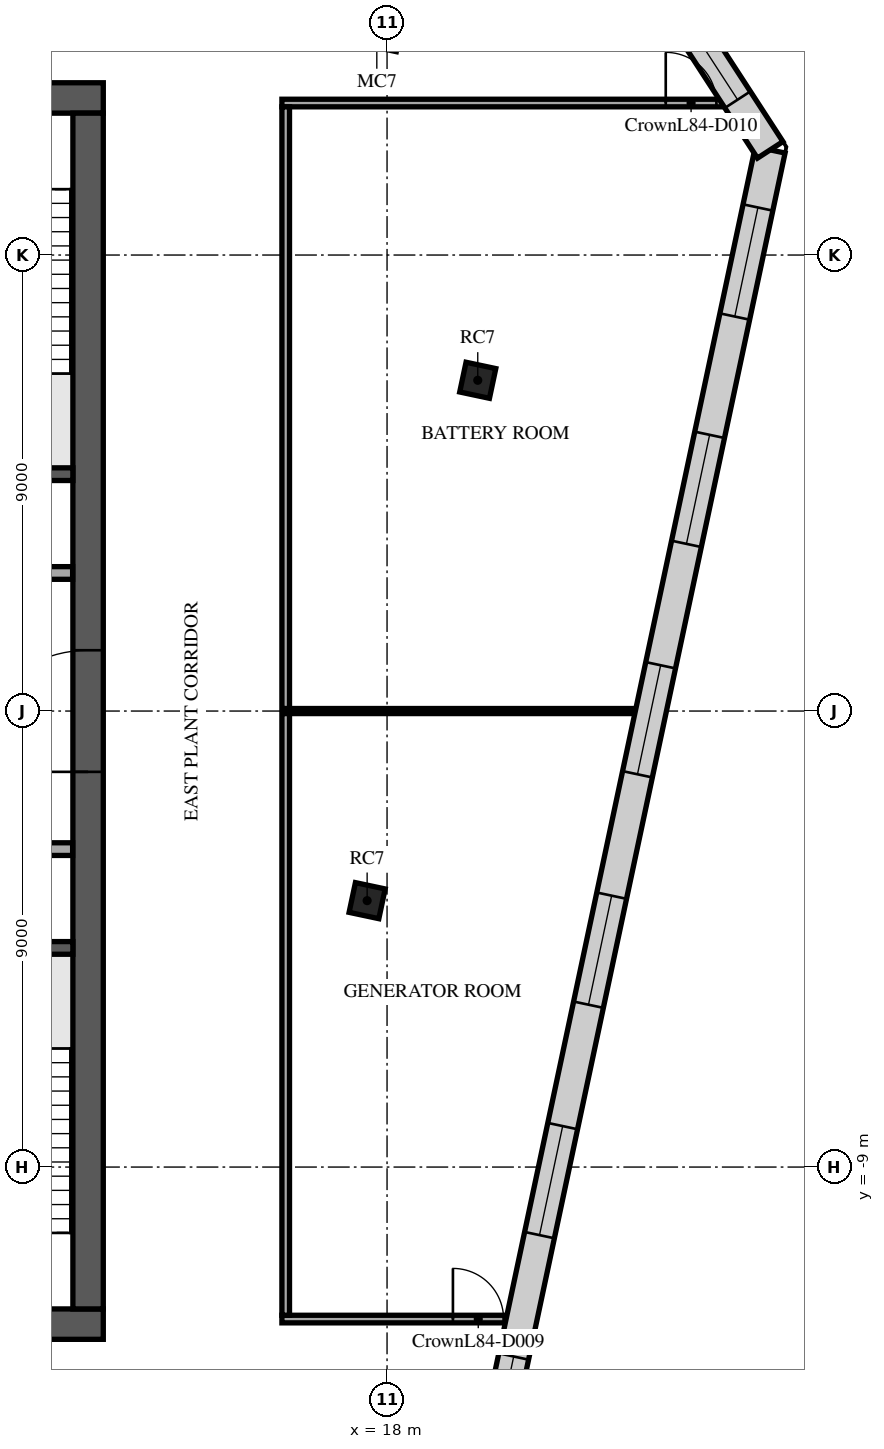
"""IFC4 building model, lengths in metres.
Left out: names, types, materials, properties, quantities, classifications, styles, units other than length and angle.
Written with IfcOpenShell. Run it as: python <this file> out.ifc"""

import sys

from ifc_helpers import new_model, si_unit, direction, frame, frame_2d, origin, origin_2d, place, context, subcontext, project, spatial, rectangle, extrude, element, fill, save


model = new_model("IFC4")
c1 = context("Model", 3, precision=1e-05, world=origin(), true_north=direction((0.0, 1.0)))
c2 = subcontext(c1, "Body", "Model", "MODEL_VIEW")
j1 = project(units=[si_unit("LENGTHUNIT", "METRE"), si_unit("PLANEANGLEUNIT", "RADIAN")], contexts=[c1])
p1 = place(None, origin())
s1 = spatial("IfcSite", under=j1, at=p1, CompositionType="ELEMENT")
p2 = place(p1, origin())
s2 = spatial("IfcBuilding", under=s1, at=p2, CompositionType="ELEMENT")
p3 = place(p2, frame((0.0, 0.0, 358.1)))
s3 = spatial("IfcBuildingStorey", under=s2, at=p3, CompositionType="ELEMENT", Elevation=358.1)
for number, where, z_axis, x_axis in (
    (1, (17.607, -3.742, 0.0), (0.0, 0.0, 1.0), (0.208, 0.978, 0.0)),
    (2, (19.79, 6.528, 0.0), (0.0, 0.0, 1.0), (0.208, 0.978, 0.0)),
):
    element("IfcColumn", number, at=place(p3, frame(where, z_axis=z_axis, x_axis=x_axis)), inside=s3, PredefinedType="COLUMN", context=c2, shape_type="SweptSolid", body=[
        extrude(rectangle(XDim=0.6, YDim=0.6, at=origin_2d()), origin(), (0.0, 0.0, 1.0), 5.0),
    ])
p4 = place(p3, frame((-12.4, 12.1, 0.0), z_axis=(0.0, 0.0, 1.0), x_axis=(1.0, 0.0, 0.0)))
e3 = element("IfcWall", 3, at=p4, inside=s3, PredefinedType="SHEAR", context=c2, shape_type="SweptSolid", body=[
    extrude(rectangle(XDim=24.8, YDim=0.6, at=frame_2d((12.4, 0.0))), origin(), (0.0, 0.0, 1.0), 4.7),
])
p5 = place(p4, frame((11.2, 0.0, 0.0)))
e4 = element("IfcOpeningElement", 4, at=p5, cuts=e3, PredefinedType="OPENING", context=c2, shape_type="SweptSolid", body=[
    extrude(rectangle(XDim=2.4, YDim=2.4, at=frame_2d((1.2, 1.2))), frame((0.0, 0.31, 0.0), z_axis=(0.0, -1.0, 0.0), x_axis=(1.0, 0.0, 0.0)), (0.0, 0.0, 1.0), 0.62),
])
p6 = place(p4, frame((22.025, 0.0, 0.0)))
e5 = element("IfcOpeningElement", 5, at=p6, cuts=e3, PredefinedType="OPENING", context=c2, shape_type="SweptSolid", body=[
    extrude(rectangle(XDim=1.2, YDim=2.1, at=frame_2d((0.6, 1.05))), frame((0.0, 0.31, 0.0), z_axis=(0.0, -1.0, 0.0), x_axis=(1.0, 0.0, 0.0)), (0.0, 0.0, 1.0), 0.62),
])
p7 = place(p4, frame((1.0, 0.0, 0.0)))
e6 = element("IfcOpeningElement", 6, at=p7, cuts=e3, PredefinedType="OPENING", context=c2, shape_type="SweptSolid", body=[
    extrude(rectangle(XDim=1.0, YDim=2.1, at=frame_2d((0.5, 1.05))), frame((0.0, 0.31, 0.0), z_axis=(0.0, -1.0, 0.0), x_axis=(1.0, 0.0, 0.0)), (0.0, 0.0, 1.0), 0.62),
])
p8 = place(p3, frame((-12.4, -12.1, 0.0), z_axis=(0.0, 0.0, 1.0), x_axis=(1.0, 0.0, 0.0)))
e7 = element("IfcWall", 7, at=p8, inside=s3, PredefinedType="SHEAR", context=c2, shape_type="SweptSolid", body=[
    extrude(rectangle(XDim=24.8, YDim=0.6, at=frame_2d((12.4, 0.0))), origin(), (0.0, 0.0, 1.0), 4.7),
])
p9 = place(p8, frame((7.3, 0.0, 0.0)))
e8 = element("IfcOpeningElement", 8, at=p9, cuts=e7, PredefinedType="OPENING", context=c2, shape_type="SweptSolid", body=[
    extrude(rectangle(XDim=2.0, YDim=2.1, at=frame_2d((1.0, 1.05))), frame((0.0, 0.31, 0.0), z_axis=(0.0, -1.0, 0.0), x_axis=(1.0, 0.0, 0.0)), (0.0, 0.0, 1.0), 0.62),
])
p10 = place(p8, frame((17.425, 0.0, 0.0)))
e9 = element("IfcOpeningElement", 9, at=p10, cuts=e7, PredefinedType="OPENING", context=c2, shape_type="SweptSolid", body=[
    extrude(rectangle(XDim=1.2, YDim=2.1, at=frame_2d((0.6, 1.05))), frame((0.0, 0.31, 0.0), z_axis=(0.0, -1.0, 0.0), x_axis=(1.0, 0.0, 0.0)), (0.0, 0.0, 1.0), 0.62),
])
p11 = place(p8, frame((1.575, 0.0, 0.0)))
e10 = element("IfcOpeningElement", 10, at=p11, cuts=e7, PredefinedType="OPENING", context=c2, shape_type="SweptSolid", body=[
    extrude(rectangle(XDim=1.2, YDim=2.1, at=frame_2d((0.6, 1.05))), frame((0.0, 0.31, 0.0), z_axis=(0.0, -1.0, 0.0), x_axis=(1.0, 0.0, 0.0)), (0.0, 0.0, 1.0), 0.62),
])
p12 = place(p8, frame((22.025, 0.0, 0.0)))
e11 = element("IfcOpeningElement", 11, at=p12, cuts=e7, PredefinedType="OPENING", context=c2, shape_type="SweptSolid", body=[
    extrude(rectangle(XDim=1.2, YDim=2.1, at=frame_2d((0.6, 1.05))), frame((0.0, 0.31, 0.0), z_axis=(0.0, -1.0, 0.0), x_axis=(1.0, 0.0, 0.0)), (0.0, 0.0, 1.0), 0.62),
])
p13 = place(p3, frame((12.1, -11.8, 0.0), z_axis=(0.0, 0.0, 1.0), x_axis=(0.0, 1.0, 0.0)))
e12 = element("IfcWall", 12, at=p13, inside=s3, PredefinedType="SHEAR", context=c2, shape_type="SweptSolid", body=[
    extrude(rectangle(XDim=23.6, YDim=0.6, at=frame_2d((11.8, 0.0))), origin(), (0.0, 0.0, 1.0), 4.7),
])
p14 = place(p13, frame((10.6, 0.0, 0.0)))
e13 = element("IfcOpeningElement", 13, at=p14, cuts=e12, PredefinedType="OPENING", context=c2, shape_type="SweptSolid", body=[
    extrude(rectangle(XDim=2.4, YDim=2.4, at=frame_2d((1.2, 1.2))), frame((0.0, 0.31, 0.0), z_axis=(0.0, -1.0, 0.0), x_axis=(1.0, 0.0, 0.0)), (0.0, 0.0, 1.0), 0.62),
])
for number, where, z_axis, x_axis in (
    (14, (8.65, 4.675, 0.0), (0.0, 0.0, 1.0), (1.0, 0.0, 0.0)),
    (15, (8.65, -4.675, 0.0), (0.0, 0.0, 1.0), (1.0, 0.0, 0.0)),
):
    element("IfcWall", number, at=place(p3, frame(where, z_axis=z_axis, x_axis=x_axis)), inside=s3, PredefinedType="SOLIDWALL", context=c2, shape_type="SweptSolid", body=[
        extrude(rectangle(XDim=3.15, YDim=0.25, at=frame_2d((1.575, 0.0))), origin(), (0.0, 0.0, 1.0), 4.7),
    ])
p15 = place(p3, frame((5.63, -2.725, 0.0), z_axis=(0.0, 0.0, 1.0), x_axis=(1.0, 0.0, 0.0)))
e16 = element("IfcWall", 16, at=p15, inside=s3, PredefinedType="PARTITIONING", context=c2, shape_type="SweptSolid", body=[
    extrude(rectangle(XDim=6.165, YDim=0.25, at=frame_2d((3.083, 0.0))), origin(), (0.0, 0.0, 1.0), 4.7),
])
p16 = place(p15, frame((0.745, 0.0, 0.0)))
e17 = element("IfcOpeningElement", 17, at=p16, cuts=e16, PredefinedType="OPENING", context=c2, shape_type="SweptSolid", body=[
    extrude(rectangle(XDim=1.0, YDim=2.1, at=frame_2d((0.5, 1.05))), frame((0.0, 0.135, 0.0), z_axis=(0.0, -1.0, 0.0), x_axis=(1.0, 0.0, 0.0)), (0.0, 0.0, 1.0), 0.27),
])
p17 = place(p15, frame((3.92, 0.0, 0.0)))
e18 = element("IfcOpeningElement", 18, at=p17, cuts=e16, PredefinedType="OPENING", context=c2, shape_type="SweptSolid", body=[
    extrude(rectangle(XDim=0.9, YDim=2.1, at=frame_2d((0.45, 1.05))), frame((0.0, 0.135, 0.0), z_axis=(0.0, -1.0, 0.0), x_axis=(1.0, 0.0, 0.0)), (0.0, 0.0, 1.0), 0.27),
])
p18 = place(p3, frame((-11.795, 2.725, 0.0), z_axis=(0.0, 0.0, 1.0), x_axis=(1.0, 0.0, 0.0)))
e19 = element("IfcWall", 19, at=p18, inside=s3, PredefinedType="PARTITIONING", context=c2, shape_type="SweptSolid", body=[
    extrude(rectangle(XDim=23.59, YDim=0.25, at=frame_2d((11.795, 0.0))), origin(), (0.0, 0.0, 1.0), 4.7),
])
p19 = place(p18, frame((21.345, 0.0, 0.0)))
e20 = element("IfcOpeningElement", 20, at=p19, cuts=e19, PredefinedType="OPENING", context=c2, shape_type="SweptSolid", body=[
    extrude(rectangle(XDim=0.9, YDim=2.1, at=frame_2d((0.45, 1.05))), frame((0.0, 0.135, 0.0), z_axis=(0.0, -1.0, 0.0), x_axis=(1.0, 0.0, 0.0)), (0.0, 0.0, 1.0), 0.27),
])
p20 = place(p18, frame((1.345, 0.0, 0.0)))
e21 = element("IfcOpeningElement", 21, at=p20, cuts=e19, PredefinedType="OPENING", context=c2, shape_type="SweptSolid", body=[
    extrude(rectangle(XDim=0.9, YDim=2.1, at=frame_2d((0.45, 1.05))), frame((0.0, 0.135, 0.0), z_axis=(0.0, -1.0, 0.0), x_axis=(1.0, 0.0, 0.0)), (0.0, 0.0, 1.0), 0.27),
])
p21 = place(p18, frame((4.32, 0.0, 0.0)))
e22 = element("IfcOpeningElement", 22, at=p21, cuts=e19, PredefinedType="OPENING", context=c2, shape_type="SweptSolid", body=[
    extrude(rectangle(XDim=1.2, YDim=2.1, at=frame_2d((0.6, 1.05))), frame((0.0, 0.135, 0.0), z_axis=(0.0, -1.0, 0.0), x_axis=(1.0, 0.0, 0.0)), (0.0, 0.0, 1.0), 0.27),
])
p22 = place(p18, frame((12.57, 0.0, 0.0)))
e23 = element("IfcOpeningElement", 23, at=p22, cuts=e19, PredefinedType="OPENING", context=c2, shape_type="SweptSolid", body=[
    extrude(rectangle(XDim=1.2, YDim=2.1, at=frame_2d((0.6, 1.05))), frame((0.0, 0.135, 0.0), z_axis=(0.0, -1.0, 0.0), x_axis=(1.0, 0.0, 0.0)), (0.0, 0.0, 1.0), 0.27),
])
p23 = place(p3, frame((15.925, -12.0, 0.0), z_axis=(0.0, 0.0, 1.0), x_axis=(1.0, 0.0, 0.0)))
e24 = element("IfcWall", 24, at=p23, inside=s3, PredefinedType="PARTITIONING", context=c2, shape_type="SweptSolid", body=[
    extrude(rectangle(XDim=4.629, YDim=0.15, at=frame_2d((2.314, 0.0))), origin(), (0.0, 0.0, 1.0), 4.7),
])
p24 = place(p23, frame((3.375, 0.0, 0.0)))
e25 = element("IfcOpeningElement", 25, at=p24, cuts=e24, PredefinedType="OPENING", context=c2, shape_type="SweptSolid", body=[
    extrude(rectangle(XDim=1.0, YDim=2.1, at=frame_2d((0.5, 1.05))), frame((0.0, 0.085, 0.0), z_axis=(0.0, -1.0, 0.0), x_axis=(1.0, 0.0, 0.0)), (0.0, 0.0, 1.0), 0.17),
])
p25 = place(p3, frame((16.075, 0.0, 0.0), z_axis=(0.0, 0.0, 1.0), x_axis=(1.0, 0.0, 0.0)))
e26 = element("IfcWall", 26, at=p25, inside=s3, PredefinedType="PARTITIONING", context=c2, shape_type="SweptSolid", body=[
    extrude(rectangle(XDim=7.03, YDim=0.1, at=frame_2d((3.515, 0.0))), origin(), (0.0, 0.0, 1.0), 4.7),
])
p26 = place(p3, frame((15.925, 12.0, 0.0), z_axis=(0.0, 0.0, 1.0), x_axis=(1.0, 0.0, 0.0)))
e27 = element("IfcWall", 27, at=p26, inside=s3, PredefinedType="PARTITIONING", context=c2, shape_type="SweptSolid", body=[
    extrude(rectangle(XDim=8.917, YDim=0.15, at=frame_2d((4.458, 0.0))), origin(), (0.0, 0.0, 1.0), 4.7),
])
p27 = place(p26, frame((7.575, 0.0, 0.0)))
e28 = element("IfcOpeningElement", 28, at=p27, cuts=e27, PredefinedType="OPENING", context=c2, shape_type="SweptSolid", body=[
    extrude(rectangle(XDim=1.0, YDim=2.1, at=frame_2d((0.5, 1.05))), frame((0.0, 0.085, 0.0), z_axis=(0.0, -1.0, 0.0), x_axis=(1.0, 0.0, 0.0)), (0.0, 0.0, 1.0), 0.17),
])
p28 = place(p3, frame((16.0, -11.925, 0.0), z_axis=(0.0, 0.0, 1.0), x_axis=(0.0, 1.0, 0.0)))
e29 = element("IfcWall", 29, at=p28, inside=s3, PredefinedType="PARTITIONING", context=c2, shape_type="SweptSolid", body=[
    extrude(rectangle(XDim=11.875, YDim=0.15, at=frame_2d((5.938, 0.0))), origin(), (0.0, 0.0, 1.0), 4.32),
])
p29 = place(p3, frame((16.0, 0.05, 0.0), z_axis=(0.0, 0.0, 1.0), x_axis=(0.0, 1.0, 0.0)))
e30 = element("IfcWall", 30, at=p29, inside=s3, PredefinedType="PARTITIONING", context=c2, shape_type="SweptSolid", body=[
    extrude(rectangle(XDim=11.875, YDim=0.15, at=frame_2d((5.938, 0.0))), origin(), (0.0, 0.0, 1.0), 4.7),
])
p30 = place(p3, frame((18.847, -20.514, 0.0), z_axis=(0.0, 0.0, 1.0), x_axis=(0.207910832809, 0.978147783109, 0.0)))
e31 = element("IfcWall", 31, at=p30, inside=s3, PredefinedType="STANDARD", context=c2, shape_type="SweptSolid", body=[
    extrude(rectangle(XDim=32.296, YDim=0.6, at=frame_2d((16.148, 0.0))), origin(), (0.0, 0.0, 1.0), 4.7),
])
p31 = place(p30, frame((1.163, 0.0, 0.6)))
e32 = element("IfcOpeningElement", 32, at=p31, cuts=e31, PredefinedType="OPENING", context=c2, shape_type="SweptSolid", body=[
    extrude(rectangle(XDim=2.2, YDim=3.35, at=frame_2d((1.1, 1.675))), frame((0.0, 0.31, 0.0), z_axis=(0.0, -1.0, 0.0), x_axis=(1.0, 0.0, 0.0)), (0.0, 0.0, 1.0), 0.62),
])
p32 = place(p30, frame((5.75, 0.0, 0.6)))
e33 = element("IfcOpeningElement", 33, at=p32, cuts=e31, PredefinedType="OPENING", context=c2, shape_type="SweptSolid", body=[
    extrude(rectangle(XDim=2.2, YDim=3.35, at=frame_2d((1.1, 1.675))), frame((0.0, 0.31, 0.0), z_axis=(0.0, -1.0, 0.0), x_axis=(1.0, 0.0, 0.0)), (0.0, 0.0, 1.0), 0.62),
])
p33 = place(p30, frame((10.399, 0.0, 0.6)))
e34 = element("IfcOpeningElement", 34, at=p33, cuts=e31, PredefinedType="OPENING", context=c2, shape_type="SweptSolid", body=[
    extrude(rectangle(XDim=2.2, YDim=3.35, at=frame_2d((1.1, 1.675))), frame((0.0, 0.31, 0.0), z_axis=(0.0, -1.0, 0.0), x_axis=(1.0, 0.0, 0.0)), (0.0, 0.0, 1.0), 0.62),
])
p34 = place(p30, frame((15.048, 0.0, 0.6)))
e35 = element("IfcOpeningElement", 35, at=p34, cuts=e31, PredefinedType="OPENING", context=c2, shape_type="SweptSolid", body=[
    extrude(rectangle(XDim=2.2, YDim=3.35, at=frame_2d((1.1, 1.675))), frame((0.0, 0.31, 0.0), z_axis=(0.0, -1.0, 0.0), x_axis=(1.0, 0.0, 0.0)), (0.0, 0.0, 1.0), 0.62),
])
p35 = place(p30, frame((19.697, 0.0, 0.6)))
e36 = element("IfcOpeningElement", 36, at=p35, cuts=e31, PredefinedType="OPENING", context=c2, shape_type="SweptSolid", body=[
    extrude(rectangle(XDim=2.2, YDim=3.35, at=frame_2d((1.1, 1.675))), frame((0.0, 0.31, 0.0), z_axis=(0.0, -1.0, 0.0), x_axis=(1.0, 0.0, 0.0)), (0.0, 0.0, 1.0), 0.62),
])
p36 = place(p30, frame((24.346, 0.0, 0.6)))
e37 = element("IfcOpeningElement", 37, at=p36, cuts=e31, PredefinedType="OPENING", context=c2, shape_type="SweptSolid", body=[
    extrude(rectangle(XDim=2.2, YDim=3.35, at=frame_2d((1.1, 1.675))), frame((0.0, 0.31, 0.0), z_axis=(0.0, -1.0, 0.0), x_axis=(1.0, 0.0, 0.0)), (0.0, 0.0, 1.0), 0.62),
])
p37 = place(p30, frame((28.933, 0.0, 0.6)))
e38 = element("IfcOpeningElement", 38, at=p37, cuts=e31, PredefinedType="OPENING", context=c2, shape_type="SweptSolid", body=[
    extrude(rectangle(XDim=2.2, YDim=3.35, at=frame_2d((1.1, 1.675))), frame((0.0, 0.31, 0.0), z_axis=(0.0, -1.0, 0.0), x_axis=(1.0, 0.0, 0.0)), (0.0, 0.0, 1.0), 0.62),
])
p38 = place(p3, frame((25.561, 11.075, 0.0), z_axis=(0.0, 0.0, 1.0), x_axis=(-0.544642093959, 0.838668581436, 0.0)))
e39 = element("IfcWall", 39, at=p38, inside=s3, PredefinedType="STANDARD", context=c2, shape_type="SweptSolid", body=[
    extrude(rectangle(XDim=13.509, YDim=0.6, at=frame_2d((6.754, 0.0))), origin(), (0.0, 0.0, 1.0), 4.7),
])
p39 = place(p38, frame((1.181, 0.0, 0.6)))
e40 = element("IfcOpeningElement", 40, at=p39, cuts=e39, PredefinedType="OPENING", context=c2, shape_type="SweptSolid", body=[
    extrude(rectangle(XDim=2.1, YDim=3.35, at=frame_2d((1.05, 1.675))), frame((0.0, 0.31, 0.0), z_axis=(0.0, -1.0, 0.0), x_axis=(1.0, 0.0, 0.0)), (0.0, 0.0, 1.0), 0.62),
])
p40 = place(p38, frame((5.704, 0.0, 0.6)))
e41 = element("IfcOpeningElement", 41, at=p40, cuts=e39, PredefinedType="OPENING", context=c2, shape_type="SweptSolid", body=[
    extrude(rectangle(XDim=2.1, YDim=3.35, at=frame_2d((1.05, 1.675))), frame((0.0, 0.31, 0.0), z_axis=(0.0, -1.0, 0.0), x_axis=(1.0, 0.0, 0.0)), (0.0, 0.0, 1.0), 0.62),
])
p41 = place(p38, frame((10.228, 0.0, 0.6)))
e42 = element("IfcOpeningElement", 42, at=p41, cuts=e39, PredefinedType="OPENING", context=c2, shape_type="SweptSolid", body=[
    extrude(rectangle(XDim=2.1, YDim=3.35, at=frame_2d((1.05, 1.675))), frame((0.0, 0.31, 0.0), z_axis=(0.0, -1.0, 0.0), x_axis=(1.0, 0.0, 0.0)), (0.0, 0.0, 1.0), 0.62),
])
p42 = place(p14, origin())
e43 = element("IfcDoor", 43, at=p42, inside=s3, OperationType="SINGLE_SWING_LEFT", PredefinedType="DOOR", context=c2, shape_type="SweptSolid", body=[
    extrude(rectangle(XDim=2.4, YDim=2.4, at=frame_2d((1.2, 1.2))), frame((0.0, 0.025, 0.0), z_axis=(0.0, -1.0, 0.0), x_axis=(1.0, 0.0, 0.0)), (0.0, 0.0, 1.0), 0.05),
])
fill(e13, e43)
p43 = place(p24, origin())
e44 = element("IfcDoor", 44, at=p43, inside=s3, OperationType="SINGLE_SWING_LEFT", PredefinedType="DOOR", context=c2, shape_type="SweptSolid", body=[
    extrude(rectangle(XDim=1.0, YDim=2.1, at=frame_2d((0.5, 1.05))), frame((0.0, 0.025, 0.0), z_axis=(0.0, -1.0, 0.0), x_axis=(1.0, 0.0, 0.0)), (0.0, 0.0, 1.0), 0.05),
])
fill(e25, e44)
p44 = place(p27, origin())
e45 = element("IfcDoor", 45, at=p44, inside=s3, OperationType="SINGLE_SWING_RIGHT", PredefinedType="DOOR", context=c2, shape_type="SweptSolid", body=[
    extrude(rectangle(XDim=1.0, YDim=2.1, at=frame_2d((0.5, 1.05))), frame((0.0, 0.025, 0.0), z_axis=(0.0, -1.0, 0.0), x_axis=(1.0, 0.0, 0.0)), (0.0, 0.0, 1.0), 0.05),
])
fill(e28, e45)
p45 = place(p32, origin())
e46 = element("IfcWindow", 46, at=p45, inside=s3, PartitioningType="SINGLE_PANEL", PredefinedType="USERDEFINED", context=c2, shape_type="SweptSolid", body=[
    extrude(rectangle(XDim=2.2, YDim=3.35, at=frame_2d((1.1, 1.675))), frame((0.0, 0.03, 0.0), z_axis=(0.0, -1.0, 0.0), x_axis=(1.0, 0.0, 0.0)), (0.0, 0.0, 1.0), 0.06),
])
fill(e33, e46)
p46 = place(p33, origin())
e47 = element("IfcWindow", 47, at=p46, inside=s3, PartitioningType="SINGLE_PANEL", PredefinedType="USERDEFINED", context=c2, shape_type="SweptSolid", body=[
    extrude(rectangle(XDim=2.2, YDim=3.35, at=frame_2d((1.1, 1.675))), frame((0.0, 0.03, 0.0), z_axis=(0.0, -1.0, 0.0), x_axis=(1.0, 0.0, 0.0)), (0.0, 0.0, 1.0), 0.06),
])
fill(e34, e47)
p47 = place(p34, origin())
e48 = element("IfcWindow", 48, at=p47, inside=s3, PartitioningType="SINGLE_PANEL", PredefinedType="USERDEFINED", context=c2, shape_type="SweptSolid", body=[
    extrude(rectangle(XDim=2.2, YDim=3.35, at=frame_2d((1.1, 1.675))), frame((0.0, 0.03, 0.0), z_axis=(0.0, -1.0, 0.0), x_axis=(1.0, 0.0, 0.0)), (0.0, 0.0, 1.0), 0.06),
])
fill(e35, e48)
p48 = place(p35, origin())
e49 = element("IfcWindow", 49, at=p48, inside=s3, PartitioningType="SINGLE_PANEL", PredefinedType="USERDEFINED", context=c2, shape_type="SweptSolid", body=[
    extrude(rectangle(XDim=2.2, YDim=3.35, at=frame_2d((1.1, 1.675))), frame((0.0, 0.03, 0.0), z_axis=(0.0, -1.0, 0.0), x_axis=(1.0, 0.0, 0.0)), (0.0, 0.0, 1.0), 0.06),
])
fill(e36, e49)
p49 = place(p36, origin())
e50 = element("IfcWindow", 50, at=p49, inside=s3, PartitioningType="SINGLE_PANEL", PredefinedType="USERDEFINED", context=c2, shape_type="SweptSolid", body=[
    extrude(rectangle(XDim=2.2, YDim=3.35, at=frame_2d((1.1, 1.675))), frame((0.0, 0.03, 0.0), z_axis=(0.0, -1.0, 0.0), x_axis=(1.0, 0.0, 0.0)), (0.0, 0.0, 1.0), 0.06),
])
fill(e37, e50)
p50 = place(p37, origin())
e51 = element("IfcWindow", 51, at=p50, inside=s3, PartitioningType="SINGLE_PANEL", PredefinedType="USERDEFINED", context=c2, shape_type="SweptSolid", body=[
    extrude(rectangle(XDim=2.2, YDim=3.35, at=frame_2d((1.1, 1.675))), frame((0.0, 0.03, 0.0), z_axis=(0.0, -1.0, 0.0), x_axis=(1.0, 0.0, 0.0)), (0.0, 0.0, 1.0), 0.06),
])
fill(e38, e51)
p51 = place(p39, origin())
e52 = element("IfcWindow", 52, at=p51, inside=s3, PartitioningType="SINGLE_PANEL", PredefinedType="USERDEFINED", context=c2, shape_type="SweptSolid", body=[
    extrude(rectangle(XDim=2.1, YDim=3.35, at=frame_2d((1.05, 1.675))), frame((0.0, 0.03, 0.0), z_axis=(0.0, -1.0, 0.0), x_axis=(1.0, 0.0, 0.0)), (0.0, 0.0, 1.0), 0.06),
])
fill(e40, e52)
save(model, sys.argv[1])
